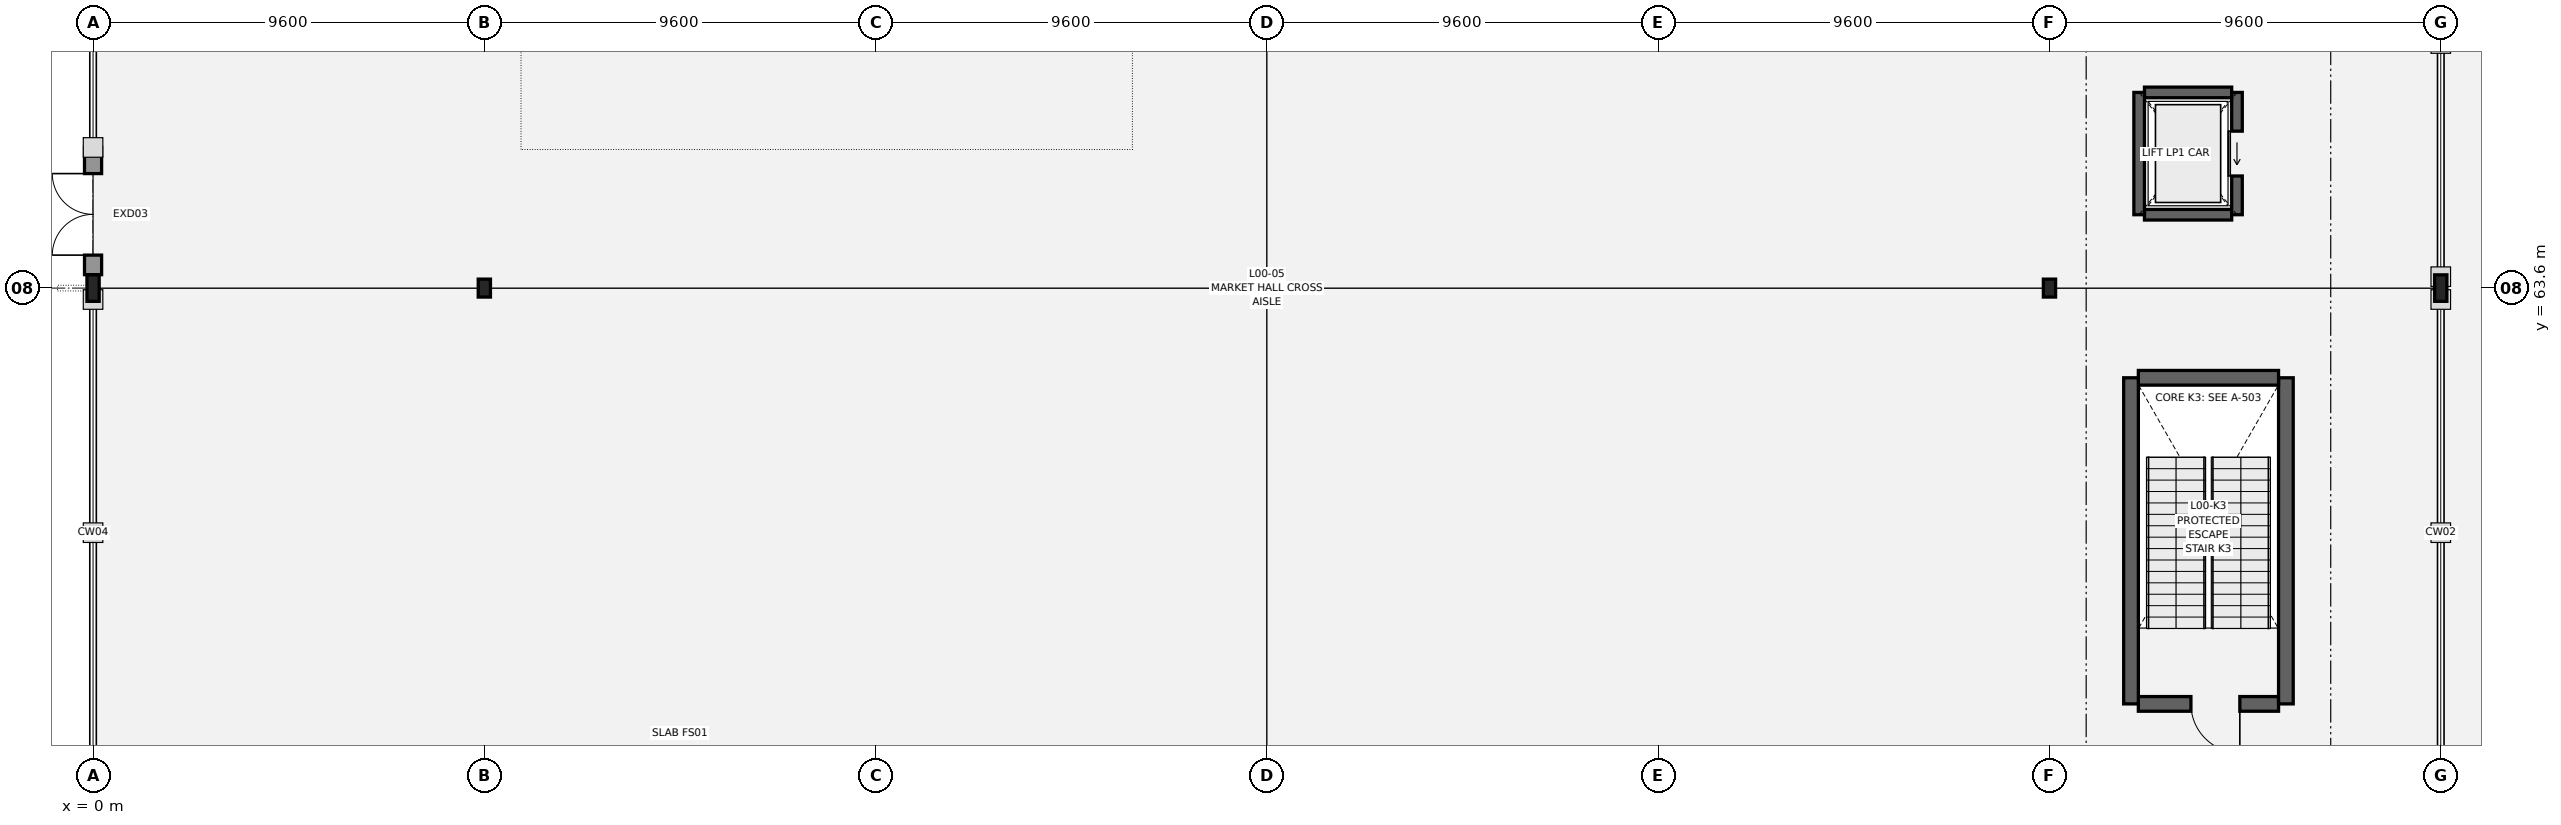
"""IFC4 building model, lengths in metres.
Left out: names, types, materials, properties, quantities, classifications, styles, units other than length and angle.
Written with IfcOpenShell. Run it as: python <this file> out.ifc"""

import sys

from ifc_helpers import new_model, si_unit, direction, frame, frame_2d, origin, origin_2d, place, context, subcontext, project, spatial, rectangle, i_section, extrude, element, fill, save


model = new_model("IFC4")
c1 = context("Model", 3, precision=1e-05, world=origin(), true_north=direction((0.0, 1.0)))
c2 = subcontext(c1, "Body", "Model", "MODEL_VIEW")
j1 = project(units=[si_unit("LENGTHUNIT", "METRE"), si_unit("PLANEANGLEUNIT", "RADIAN")], contexts=[c1])
p1 = place(None, origin())
s1 = spatial("IfcSite", under=j1, at=p1, CompositionType="ELEMENT")
p2 = place(p1, origin())
s2 = spatial("IfcBuilding", under=s1, at=p2, CompositionType="ELEMENT")
p3 = place(p2, origin())
s3 = spatial("IfcBuildingStorey", under=s2, at=p3, CompositionType="ELEMENT", Elevation=0.0)
p4 = place(p3, frame((0.0, 63.6, 0.0), z_axis=(0.0, 0.0, 1.0), x_axis=(1.0, 0.0, 0.0)))
e1 = element("IfcColumn", 1, at=p4, inside=s3, PredefinedType="COLUMN", context=c2, shape_type="SweptSolid", body=[
    extrude(i_section(OverallWidth=0.3, OverallDepth=0.65, WebThickness=0.016, FlangeThickness=0.031, FilletRadius=0.027, at=origin_2d()), origin(), (0.0, 0.0, 1.0), 5.4),
])
for number, where, z_axis, x_axis in (
    (2, (9.6, 63.6, 0.0), (0.0, 0.0, 1.0), (1.0, 0.0, 0.0)),
    (3, (48.0, 63.6, 0.0), (0.0, 0.0, 1.0), (1.0, 0.0, 0.0)),
):
    element("IfcColumn", number, at=place(p3, frame(where, z_axis=z_axis, x_axis=x_axis)), inside=s3, PredefinedType="COLUMN", context=c2, shape_type="SweptSolid", body=[
        extrude(i_section(OverallWidth=0.3, OverallDepth=0.44, WebThickness=0.011, FlangeThickness=0.021, FilletRadius=0.027, at=origin_2d()), origin(), (0.0, 0.0, 1.0), 5.4),
    ])
p5 = place(p3, frame((57.6, 63.6, 0.0), z_axis=(0.0, 0.0, 1.0), x_axis=(1.0, 0.0, 0.0)))
e4 = element("IfcColumn", 4, at=p5, inside=s3, PredefinedType="COLUMN", context=c2, shape_type="SweptSolid", body=[
    extrude(i_section(OverallWidth=0.3, OverallDepth=0.65, WebThickness=0.016, FlangeThickness=0.031, FilletRadius=0.027, at=origin_2d()), origin(), (0.0, 0.0, 1.0), 5.4),
])
p6 = place(p3, frame((53.62, 53.4, 0.0), z_axis=(0.0, 0.0, 1.0), x_axis=(-1.0, 0.0, 0.0)))
e5 = element("IfcWall", 5, at=p6, inside=s3, PredefinedType="SHEAR", context=c2, shape_type="SweptSolid", body=[
    extrude(rectangle(XDim=3.44, YDim=0.36, at=frame_2d((1.72, 0.0))), origin(), (0.0, 0.0, 1.0), 5.12),
])
p7 = place(p6, frame((0.95, 0.0, 0.0)))
e6 = element("IfcOpeningElement", 6, at=p7, cuts=e5, PredefinedType="OPENING", context=c2, shape_type="SweptSolid", body=[
    extrude(rectangle(XDim=1.2, YDim=2.2, at=frame_2d((0.6, 1.1))), frame((0.0, 0.19, 0.0), z_axis=(0.0, -1.0, 0.0), x_axis=(1.0, 0.0, 0.0)), (0.0, 0.0, 1.0), 0.38),
])
p8 = place(p3, frame((53.8, 53.4, 0.0), z_axis=(0.0, 0.0, 1.0), x_axis=(0.0, 1.0, 0.0)))
e7 = element("IfcWall", 7, at=p8, inside=s3, PredefinedType="SHEAR", context=c2, shape_type="SweptSolid", body=[
    extrude(rectangle(XDim=8.0, YDim=0.36, at=frame_2d((4.0, 0.0))), origin(), (0.0, 0.0, 1.0), 5.12),
])
p9 = place(p3, frame((53.62, 61.4, 0.0), z_axis=(0.0, 0.0, 1.0), x_axis=(-1.0, 0.0, 0.0)))
e8 = element("IfcWall", 8, at=p9, inside=s3, PredefinedType="SHEAR", context=c2, shape_type="SweptSolid", body=[
    extrude(rectangle(XDim=3.44, YDim=0.36, at=frame_2d((1.72, 0.0))), origin(), (0.0, 0.0, 1.0), 5.12),
])
p10 = place(p3, frame((50.0, 61.4, 0.0), z_axis=(0.0, 0.0, 1.0), x_axis=(0.0, -1.0, 0.0)))
e9 = element("IfcWall", 9, at=p10, inside=s3, PredefinedType="SHEAR", context=c2, shape_type="SweptSolid", body=[
    extrude(rectangle(XDim=8.0, YDim=0.36, at=frame_2d((4.0, 0.0))), origin(), (0.0, 0.0, 1.0), 5.12),
])
p11 = place(p3, frame((50.33, 65.4, 0.0), z_axis=(0.0, 0.0, 1.0), x_axis=(1.0, 0.0, 0.0)))
e10 = element("IfcWall", 10, at=p11, inside=s3, PredefinedType="SHEAR", context=c2, shape_type="SweptSolid", body=[
    extrude(rectangle(XDim=2.14, YDim=0.26, at=frame_2d((1.07, 0.0))), origin(), (0.0, 0.0, 1.0), 5.12),
])
p12 = place(p3, frame((52.6, 65.4, 0.0), z_axis=(0.0, 0.0, 1.0), x_axis=(0.0, 1.0, 0.0)))
e11 = element("IfcWall", 11, at=p12, inside=s3, PredefinedType="SHEAR", context=c2, shape_type="SweptSolid", body=[
    extrude(rectangle(XDim=3.0, YDim=0.26, at=frame_2d((1.5, 0.0))), origin(), (0.0, 0.0, 1.0), 5.12),
])
p13 = place(p12, frame((0.95, 0.0, 0.0)))
e12 = element("IfcOpeningElement", 12, at=p13, cuts=e11, PredefinedType="OPENING", context=c2, shape_type="SweptSolid", body=[
    extrude(rectangle(XDim=1.1, YDim=2.1, at=frame_2d((0.55, 1.05))), frame((0.0, 0.14, 0.0), z_axis=(0.0, -1.0, 0.0), x_axis=(1.0, 0.0, 0.0)), (0.0, 0.0, 1.0), 0.28),
])
p14 = place(p3, frame((52.47, 68.4, 0.0), z_axis=(0.0, 0.0, 1.0), x_axis=(-1.0, 0.0, 0.0)))
e13 = element("IfcWall", 13, at=p14, inside=s3, PredefinedType="SHEAR", context=c2, shape_type="SweptSolid", body=[
    extrude(rectangle(XDim=2.14, YDim=0.26, at=frame_2d((1.07, 0.0))), origin(), (0.0, 0.0, 1.0), 5.12),
])
p15 = place(p3, frame((50.2, 68.4, 0.0), z_axis=(0.0, 0.0, 1.0), x_axis=(0.0, -1.0, 0.0)))
e14 = element("IfcWall", 14, at=p15, inside=s3, PredefinedType="SHEAR", context=c2, shape_type="SweptSolid", body=[
    extrude(rectangle(XDim=3.0, YDim=0.26, at=frame_2d((1.5, 0.0))), origin(), (0.0, 0.0, 1.0), 5.12),
])
p16 = place(p3, frame((0.0, 63.929, 0.0), z_axis=(0.0, 0.0, 1.0), x_axis=(0.0, 1.0, 0.0)))
e15 = element("IfcWall", 15, at=p16, inside=s3, PredefinedType="STANDARD", context=c2, shape_type="SweptSolid", body=[
    extrude(rectangle(XDim=3.121, YDim=0.42, at=frame_2d((1.561, 0.0))), origin(), (0.0, 0.0, 1.0), 4.7),
])
p17 = place(p16, frame((0.48, 0.0, 0.0)))
e16 = element("IfcOpeningElement", 16, at=p17, cuts=e15, PredefinedType="OPENING", context=c2, shape_type="SweptSolid", body=[
    extrude(rectangle(XDim=2.0, YDim=2.3, at=frame_2d((1.0, 1.15))), frame((0.0, 0.22, 0.0), z_axis=(0.0, -1.0, 0.0), x_axis=(1.0, 0.0, 0.0)), (0.0, 0.0, 1.0), 0.44),
])
p18 = place(p17, origin())
e17 = element("IfcDoor", 17, at=p18, inside=s3, OperationType="DOUBLE_DOOR_SINGLE_SWING", PredefinedType="DOOR", context=c2, shape_type="SweptSolid", body=[
    extrude(rectangle(XDim=2.0, YDim=2.3, at=frame_2d((1.0, 1.15))), frame((0.0, 0.025, 0.0), z_axis=(0.0, -1.0, 0.0), x_axis=(1.0, 0.0, 0.0)), (0.0, 0.0, 1.0), 0.05),
])
fill(e16, e17)
p19 = place(p7, origin())
e18 = element("IfcDoor", 18, at=p19, inside=s3, OperationType="SINGLE_SWING_LEFT", PredefinedType="DOOR", context=c2, shape_type="SweptSolid", body=[
    extrude(rectangle(XDim=1.2, YDim=2.2, at=frame_2d((0.6, 1.1))), frame((0.0, 0.025, 0.0), z_axis=(0.0, -1.0, 0.0), x_axis=(1.0, 0.0, 0.0)), (0.0, 0.0, 1.0), 0.05),
])
fill(e6, e18)
p20 = place(p13, origin())
e19 = element("IfcDoor", 19, at=p20, inside=s3, OperationType="SLIDING_TO_LEFT", PredefinedType="DOOR", context=c2, shape_type="SweptSolid", body=[
    extrude(rectangle(XDim=1.1, YDim=2.1, at=frame_2d((0.55, 1.05))), frame((0.0, 0.025, 0.0), z_axis=(0.0, -1.0, 0.0), x_axis=(1.0, 0.0, 0.0)), (0.0, 0.0, 1.0), 0.05),
])
fill(e12, e19)
save(model, sys.argv[1])
